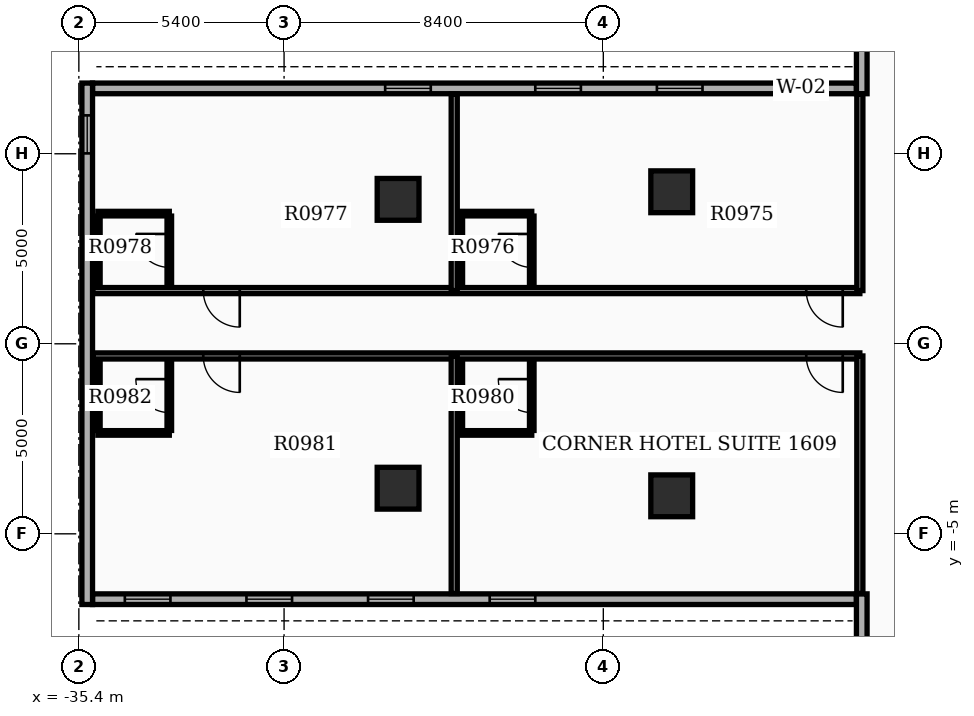
"""IFC4 building model, lengths in metres.
Left out: names, types, materials, properties, quantities, classifications, styles, units other than length and angle.
Written with IfcOpenShell. Run it as: python <this file> out.ifc"""

import sys

from ifc_helpers import new_model, si_unit, direction, frame, frame_2d, origin, origin_2d, place, context, subcontext, project, spatial, rectangle, extrude, element, fill, save


model = new_model("IFC4")
c1 = context("Model", 3, precision=1e-05, world=origin(), true_north=direction((0.0, 1.0)))
c2 = subcontext(c1, "Body", "Model", "MODEL_VIEW")
j1 = project(units=[si_unit("LENGTHUNIT", "METRE"), si_unit("PLANEANGLEUNIT", "RADIAN")], contexts=[c1])
p1 = place(None, origin())
s1 = spatial("IfcSite", under=j1, at=p1, CompositionType="ELEMENT")
p2 = place(p1, origin())
s2 = spatial("IfcBuilding", under=s1, at=p2, CompositionType="ELEMENT")
p3 = place(p2, frame((0.0, 0.0, 63.9)))
s3 = spatial("IfcBuildingStorey", under=s2, at=p3, CompositionType="ELEMENT", Elevation=63.9)
for number, where, z_axis, x_axis in (
    (1, (-19.8, -4.0, 0.0), (0.0, 0.0, 1.0), (1.0, 0.0, 0.0)),
    (2, (-19.8, 4.0, 0.0), (0.0, 0.0, 1.0), (1.0, 0.0, 0.0)),
    (3, (-27.0, -3.8, 0.0), (0.0, 0.0, 1.0), (1.0, 0.0, 0.0)),
    (4, (-27.0, 3.8, 0.0), (0.0, 0.0, 1.0), (1.0, 0.0, 0.0)),
):
    element("IfcColumn", number, at=place(p3, frame(where, z_axis=z_axis, x_axis=x_axis)), inside=s3, PredefinedType="COLUMN", context=c2, shape_type="SweptSolid", body=[
        extrude(rectangle(XDim=1.1, YDim=1.1, at=origin_2d()), origin(), (0.0, 0.0, 1.0), 3.9),
    ])
p4 = place(p3, frame((-14.94, 6.72, 0.0), z_axis=(0.0, 0.0, 1.0), x_axis=(-1.0, 0.0, 0.0)))
e5 = element("IfcWall", 5, at=p4, inside=s3, PredefinedType="STANDARD", context=c2, shape_type="SweptSolid", body=[
    extrude(rectangle(XDim=20.1, YDim=0.28, at=frame_2d((10.05, 0.0))), origin(), (0.0, 0.0, 1.0), 2.91),
])
p5 = place(p4, frame((0.85, 0.0, 0.8)))
e6 = element("IfcOpeningElement", 6, at=p5, cuts=e5, PredefinedType="OPENING", context=c2, shape_type="SweptSolid", body=[
    extrude(rectangle(XDim=1.2, YDim=1.6, at=frame_2d((0.6, 0.8))), frame((0.0, 0.15, 0.0), z_axis=(0.0, -1.0, 0.0), x_axis=(1.0, 0.0, 0.0)), (0.0, 0.0, 1.0), 0.3),
])
p6 = place(p4, frame((4.05, 0.0, 0.8)))
e7 = element("IfcOpeningElement", 7, at=p6, cuts=e5, PredefinedType="OPENING", context=c2, shape_type="SweptSolid", body=[
    extrude(rectangle(XDim=1.2, YDim=1.6, at=frame_2d((0.6, 0.8))), frame((0.0, 0.15, 0.0), z_axis=(0.0, -1.0, 0.0), x_axis=(1.0, 0.0, 0.0)), (0.0, 0.0, 1.0), 0.3),
])
p7 = place(p4, frame((7.25, 0.0, 0.8)))
e8 = element("IfcOpeningElement", 8, at=p7, cuts=e5, PredefinedType="OPENING", context=c2, shape_type="SweptSolid", body=[
    extrude(rectangle(XDim=1.2, YDim=1.6, at=frame_2d((0.6, 0.8))), frame((0.0, 0.15, 0.0), z_axis=(0.0, -1.0, 0.0), x_axis=(1.0, 0.0, 0.0)), (0.0, 0.0, 1.0), 0.3),
])
p8 = place(p4, frame((11.2, 0.0, 0.8)))
e9 = element("IfcOpeningElement", 9, at=p8, cuts=e5, PredefinedType="OPENING", context=c2, shape_type="SweptSolid", body=[
    extrude(rectangle(XDim=1.2, YDim=1.6, at=frame_2d((0.6, 0.8))), frame((0.0, 0.15, 0.0), z_axis=(0.0, -1.0, 0.0), x_axis=(1.0, 0.0, 0.0)), (0.0, 0.0, 1.0), 0.3),
])
p9 = place(p3, frame((-35.04, -6.72, 0.0), z_axis=(0.0, 0.0, 1.0), x_axis=(1.0, 0.0, 0.0)))
e10 = element("IfcWall", 10, at=p9, inside=s3, PredefinedType="STANDARD", context=c2, shape_type="SweptSolid", body=[
    extrude(rectangle(XDim=20.1, YDim=0.28, at=frame_2d((10.05, 0.0))), origin(), (0.0, 0.0, 1.0), 2.91),
])
p10 = place(p9, frame((0.85, 0.0, 0.8)))
e11 = element("IfcOpeningElement", 11, at=p10, cuts=e10, PredefinedType="OPENING", context=c2, shape_type="SweptSolid", body=[
    extrude(rectangle(XDim=1.2, YDim=1.6, at=frame_2d((0.6, 0.8))), frame((0.0, 0.15, 0.0), z_axis=(0.0, -1.0, 0.0), x_axis=(1.0, 0.0, 0.0)), (0.0, 0.0, 1.0), 0.3),
])
p11 = place(p9, frame((4.05, 0.0, 0.8)))
e12 = element("IfcOpeningElement", 12, at=p11, cuts=e10, PredefinedType="OPENING", context=c2, shape_type="SweptSolid", body=[
    extrude(rectangle(XDim=1.2, YDim=1.6, at=frame_2d((0.6, 0.8))), frame((0.0, 0.15, 0.0), z_axis=(0.0, -1.0, 0.0), x_axis=(1.0, 0.0, 0.0)), (0.0, 0.0, 1.0), 0.3),
])
p12 = place(p9, frame((7.25, 0.0, 0.8)))
e13 = element("IfcOpeningElement", 13, at=p12, cuts=e10, PredefinedType="OPENING", context=c2, shape_type="SweptSolid", body=[
    extrude(rectangle(XDim=1.2, YDim=1.6, at=frame_2d((0.6, 0.8))), frame((0.0, 0.15, 0.0), z_axis=(0.0, -1.0, 0.0), x_axis=(1.0, 0.0, 0.0)), (0.0, 0.0, 1.0), 0.3),
])
p13 = place(p9, frame((10.45, 0.0, 0.8)))
e14 = element("IfcOpeningElement", 14, at=p13, cuts=e10, PredefinedType="OPENING", context=c2, shape_type="SweptSolid", body=[
    extrude(rectangle(XDim=1.2, YDim=1.6, at=frame_2d((0.6, 0.8))), frame((0.0, 0.15, 0.0), z_axis=(0.0, -1.0, 0.0), x_axis=(1.0, 0.0, 0.0)), (0.0, 0.0, 1.0), 0.3),
])
p14 = place(p3, frame((-35.18, 6.86, 0.0), z_axis=(0.0, 0.0, 1.0), x_axis=(0.0, -1.0, 0.0)))
e15 = element("IfcWall", 15, at=p14, inside=s3, PredefinedType="STANDARD", context=c2, shape_type="SweptSolid", body=[
    extrude(rectangle(XDim=13.72, YDim=0.28, at=frame_2d((6.86, 0.0))), origin(), (0.0, 0.0, 1.0), 2.91),
])
p15 = place(p14, frame((0.85, 0.0, 0.85)))
e16 = element("IfcOpeningElement", 16, at=p15, cuts=e15, PredefinedType="OPENING", context=c2, shape_type="SweptSolid", body=[
    extrude(rectangle(XDim=1.0, YDim=1.5, at=frame_2d((0.5, 0.75))), frame((0.0, 0.15, 0.0), z_axis=(0.0, -1.0, 0.0), x_axis=(1.0, 0.0, 0.0)), (0.0, 0.0, 1.0), 0.3),
])
for number, where, z_axis, x_axis in (
    (17, (-14.8, 6.58, 0.0), (0.0, 0.0, 1.0), (0.0, 1.0, 0.0)),
    (18, (-14.8, -6.58, 0.0), (0.0, 0.0, 1.0), (0.0, -1.0, 0.0)),
):
    element("IfcWall", number, at=place(p3, frame(where, z_axis=z_axis, x_axis=x_axis)), inside=s3, PredefinedType="STANDARD", context=c2, shape_type="SweptSolid", body=[
        extrude(rectangle(XDim=6.86, YDim=0.28, at=frame_2d((3.43, 0.0))), origin(), (0.0, 0.0, 1.0), 2.91),
    ])
p16 = place(p3, frame((-14.85, 1.4, 0.0), z_axis=(0.0, 0.0, 1.0), x_axis=(-1.0, 0.0, 0.0)))
e19 = element("IfcWall", 19, at=p16, inside=s3, PredefinedType="PARTITIONING", context=c2, shape_type="SweptSolid", body=[
    extrude(rectangle(XDim=20.182, YDim=0.16, at=frame_2d((10.091, 0.0))), origin(), (0.0, 0.0, 1.0), 2.9),
])
p17 = place(p16, frame((0.45, 0.0, 0.0)))
e20 = element("IfcOpeningElement", 20, at=p17, cuts=e19, PredefinedType="OPENING", context=c2, shape_type="SweptSolid", body=[
    extrude(rectangle(XDim=0.96, YDim=2.15, at=frame_2d((0.48, 1.075))), frame((0.0, 0.09, 0.0), z_axis=(0.0, -1.0, 0.0), x_axis=(1.0, 0.0, 0.0)), (0.0, 0.0, 1.0), 0.18),
])
p18 = place(p16, frame((16.316, 0.0, 0.0)))
e21 = element("IfcOpeningElement", 21, at=p18, cuts=e19, PredefinedType="OPENING", context=c2, shape_type="SweptSolid", body=[
    extrude(rectangle(XDim=0.96, YDim=2.15, at=frame_2d((0.48, 1.075))), frame((0.0, 0.09, 0.0), z_axis=(0.0, -1.0, 0.0), x_axis=(1.0, 0.0, 0.0)), (0.0, 0.0, 1.0), 0.18),
])
for number, where, z_axis, x_axis in (
    (22, (-14.85, 1.4, 0.0), (0.0, 0.0, 1.0), (0.0, 1.0, 0.0)),
    (23, (-25.523, 1.4, 0.0), (0.0, 0.0, 1.0), (0.0, 1.0, 0.0)),
):
    element("IfcWall", number, at=place(p3, frame(where, z_axis=z_axis, x_axis=x_axis)), inside=s3, PredefinedType="PARTITIONING", context=c2, shape_type="SweptSolid", body=[
        extrude(rectangle(XDim=5.172, YDim=0.16, at=frame_2d((2.586, 0.0))), origin(), (0.0, 0.0, 1.0), 2.9),
    ])
p19 = place(p3, frame((-23.483, 1.54, 0.0), z_axis=(0.0, 0.0, 1.0), x_axis=(0.0, 1.0, 0.0)))
e24 = element("IfcWall", 24, at=p19, inside=s3, PredefinedType="PARTITIONING", context=c2, shape_type="SweptSolid", body=[
    extrude(rectangle(XDim=1.82, YDim=0.12, at=frame_2d((0.91, 0.0))), origin(), (0.0, 0.0, 1.0), 2.9),
])
p20 = place(p19, frame((0.47, 0.0, 0.0)))
e25 = element("IfcOpeningElement", 25, at=p20, cuts=e24, PredefinedType="OPENING", context=c2, shape_type="SweptSolid", body=[
    extrude(rectangle(XDim=0.88, YDim=2.1, at=frame_2d((0.44, 1.05))), frame((0.0, 0.07, 0.0), z_axis=(0.0, -1.0, 0.0), x_axis=(1.0, 0.0, 0.0)), (0.0, 0.0, 1.0), 0.14),
])
p21 = place(p3, frame((-25.363, 1.54, 0.0), z_axis=(0.0, 0.0, 1.0), x_axis=(0.0, 1.0, 0.0)))
e26 = element("IfcWall", 26, at=p21, inside=s3, PredefinedType="PARTITIONING", context=c2, shape_type="SweptSolid", body=[
    extrude(rectangle(XDim=1.82, YDim=0.12, at=frame_2d((0.91, 0.0))), origin(), (0.0, 0.0, 1.0), 2.9),
])
p22 = place(p3, frame((-23.483, 3.425, 0.0), z_axis=(0.0, 0.0, 1.0), x_axis=(-1.0, 0.0, 0.0)))
e27 = element("IfcWall", 27, at=p22, inside=s3, PredefinedType="PARTITIONING", context=c2, shape_type="SweptSolid", body=[
    extrude(rectangle(XDim=1.88, YDim=0.12, at=frame_2d((0.94, 0.0))), origin(), (0.0, 0.0, 1.0), 2.9),
])
p23 = place(p3, frame((-33.02, 1.54, 0.0), z_axis=(0.0, 0.0, 1.0), x_axis=(0.0, 1.0, 0.0)))
e28 = element("IfcWall", 28, at=p23, inside=s3, PredefinedType="PARTITIONING", context=c2, shape_type="SweptSolid", body=[
    extrude(rectangle(XDim=1.82, YDim=0.12, at=frame_2d((0.91, 0.0))), origin(), (0.0, 0.0, 1.0), 2.9),
])
p24 = place(p23, frame((0.47, 0.0, 0.0)))
e29 = element("IfcOpeningElement", 29, at=p24, cuts=e28, PredefinedType="OPENING", context=c2, shape_type="SweptSolid", body=[
    extrude(rectangle(XDim=0.88, YDim=2.1, at=frame_2d((0.44, 1.05))), frame((0.0, 0.07, 0.0), z_axis=(0.0, -1.0, 0.0), x_axis=(1.0, 0.0, 0.0)), (0.0, 0.0, 1.0), 0.14),
])
p25 = place(p3, frame((-34.9, 1.54, 0.0), z_axis=(0.0, 0.0, 1.0), x_axis=(0.0, 1.0, 0.0)))
e30 = element("IfcWall", 30, at=p25, inside=s3, PredefinedType="PARTITIONING", context=c2, shape_type="SweptSolid", body=[
    extrude(rectangle(XDim=1.82, YDim=0.12, at=frame_2d((0.91, 0.0))), origin(), (0.0, 0.0, 1.0), 2.9),
])
p26 = place(p3, frame((-33.02, 3.425, 0.0), z_axis=(0.0, 0.0, 1.0), x_axis=(-1.0, 0.0, 0.0)))
e31 = element("IfcWall", 31, at=p26, inside=s3, PredefinedType="PARTITIONING", context=c2, shape_type="SweptSolid", body=[
    extrude(rectangle(XDim=1.88, YDim=0.12, at=frame_2d((0.94, 0.0))), origin(), (0.0, 0.0, 1.0), 2.9),
])
p27 = place(p3, frame((-14.85, -0.32, 0.0), z_axis=(0.0, 0.0, 1.0), x_axis=(-1.0, 0.0, 0.0)))
e32 = element("IfcWall", 32, at=p27, inside=s3, PredefinedType="PARTITIONING", context=c2, shape_type="SweptSolid", body=[
    extrude(rectangle(XDim=20.182, YDim=0.16, at=frame_2d((10.091, 0.0))), origin(), (0.0, 0.0, 1.0), 2.9),
])
p28 = place(p27, frame((0.45, 0.0, 0.0)))
e33 = element("IfcOpeningElement", 33, at=p28, cuts=e32, PredefinedType="OPENING", context=c2, shape_type="SweptSolid", body=[
    extrude(rectangle(XDim=0.96, YDim=2.15, at=frame_2d((0.48, 1.075))), frame((0.0, 0.09, 0.0), z_axis=(0.0, -1.0, 0.0), x_axis=(1.0, 0.0, 0.0)), (0.0, 0.0, 1.0), 0.18),
])
p29 = place(p27, frame((16.316, 0.0, 0.0)))
e34 = element("IfcOpeningElement", 34, at=p29, cuts=e32, PredefinedType="OPENING", context=c2, shape_type="SweptSolid", body=[
    extrude(rectangle(XDim=0.96, YDim=2.15, at=frame_2d((0.48, 1.075))), frame((0.0, 0.09, 0.0), z_axis=(0.0, -1.0, 0.0), x_axis=(1.0, 0.0, 0.0)), (0.0, 0.0, 1.0), 0.18),
])
for number, where, z_axis, x_axis in (
    (35, (-14.85, -0.32, 0.0), (0.0, 0.0, 1.0), (0.0, -1.0, 0.0)),
    (36, (-25.523, -0.32, 0.0), (0.0, 0.0, 1.0), (0.0, -1.0, 0.0)),
):
    element("IfcWall", number, at=place(p3, frame(where, z_axis=z_axis, x_axis=x_axis)), inside=s3, PredefinedType="PARTITIONING", context=c2, shape_type="SweptSolid", body=[
        extrude(rectangle(XDim=6.252, YDim=0.16, at=frame_2d((3.126, 0.0))), origin(), (0.0, 0.0, 1.0), 2.9),
    ])
p30 = place(p3, frame((-23.483, -2.28, 0.0), z_axis=(0.0, 0.0, 1.0), x_axis=(0.0, 1.0, 0.0)))
e37 = element("IfcWall", 37, at=p30, inside=s3, PredefinedType="PARTITIONING", context=c2, shape_type="SweptSolid", body=[
    extrude(rectangle(XDim=1.82, YDim=0.12, at=frame_2d((0.91, 0.0))), origin(), (0.0, 0.0, 1.0), 2.9),
])
p31 = place(p30, frame((0.47, 0.0, 0.0)))
e38 = element("IfcOpeningElement", 38, at=p31, cuts=e37, PredefinedType="OPENING", context=c2, shape_type="SweptSolid", body=[
    extrude(rectangle(XDim=0.88, YDim=2.1, at=frame_2d((0.44, 1.05))), frame((0.0, 0.07, 0.0), z_axis=(0.0, -1.0, 0.0), x_axis=(1.0, 0.0, 0.0)), (0.0, 0.0, 1.0), 0.14),
])
p32 = place(p3, frame((-25.363, -2.28, 0.0), z_axis=(0.0, 0.0, 1.0), x_axis=(0.0, 1.0, 0.0)))
e39 = element("IfcWall", 39, at=p32, inside=s3, PredefinedType="PARTITIONING", context=c2, shape_type="SweptSolid", body=[
    extrude(rectangle(XDim=1.82, YDim=0.12, at=frame_2d((0.91, 0.0))), origin(), (0.0, 0.0, 1.0), 2.9),
])
p33 = place(p3, frame((-23.483, -2.345, 0.0), z_axis=(0.0, 0.0, 1.0), x_axis=(-1.0, 0.0, 0.0)))
e40 = element("IfcWall", 40, at=p33, inside=s3, PredefinedType="PARTITIONING", context=c2, shape_type="SweptSolid", body=[
    extrude(rectangle(XDim=1.88, YDim=0.12, at=frame_2d((0.94, 0.0))), origin(), (0.0, 0.0, 1.0), 2.9),
])
p34 = place(p3, frame((-33.02, -2.28, 0.0), z_axis=(0.0, 0.0, 1.0), x_axis=(0.0, 1.0, 0.0)))
e41 = element("IfcWall", 41, at=p34, inside=s3, PredefinedType="PARTITIONING", context=c2, shape_type="SweptSolid", body=[
    extrude(rectangle(XDim=1.82, YDim=0.12, at=frame_2d((0.91, 0.0))), origin(), (0.0, 0.0, 1.0), 2.9),
])
p35 = place(p34, frame((0.47, 0.0, 0.0)))
e42 = element("IfcOpeningElement", 42, at=p35, cuts=e41, PredefinedType="OPENING", context=c2, shape_type="SweptSolid", body=[
    extrude(rectangle(XDim=0.88, YDim=2.1, at=frame_2d((0.44, 1.05))), frame((0.0, 0.07, 0.0), z_axis=(0.0, -1.0, 0.0), x_axis=(1.0, 0.0, 0.0)), (0.0, 0.0, 1.0), 0.14),
])
p36 = place(p3, frame((-34.9, -2.28, 0.0), z_axis=(0.0, 0.0, 1.0), x_axis=(0.0, 1.0, 0.0)))
e43 = element("IfcWall", 43, at=p36, inside=s3, PredefinedType="PARTITIONING", context=c2, shape_type="SweptSolid", body=[
    extrude(rectangle(XDim=1.82, YDim=0.12, at=frame_2d((0.91, 0.0))), origin(), (0.0, 0.0, 1.0), 2.9),
])
p37 = place(p3, frame((-33.02, -2.345, 0.0), z_axis=(0.0, 0.0, 1.0), x_axis=(-1.0, 0.0, 0.0)))
e44 = element("IfcWall", 44, at=p37, inside=s3, PredefinedType="PARTITIONING", context=c2, shape_type="SweptSolid", body=[
    extrude(rectangle(XDim=1.88, YDim=0.12, at=frame_2d((0.94, 0.0))), origin(), (0.0, 0.0, 1.0), 2.9),
])
p38 = place(p5, origin())
e45 = element("IfcWindow", 45, at=p38, inside=s3, PartitioningType="SINGLE_PANEL", PredefinedType="WINDOW", context=c2, shape_type="SweptSolid", body=[
    extrude(rectangle(XDim=1.2, YDim=1.6, at=frame_2d((0.6, 0.8))), frame((0.0, 0.03, 0.0), z_axis=(0.0, -1.0, 0.0), x_axis=(1.0, 0.0, 0.0)), (0.0, 0.0, 1.0), 0.06),
])
fill(e6, e45)
p39 = place(p6, origin())
e46 = element("IfcWindow", 46, at=p39, inside=s3, PartitioningType="SINGLE_PANEL", PredefinedType="WINDOW", context=c2, shape_type="SweptSolid", body=[
    extrude(rectangle(XDim=1.2, YDim=1.6, at=frame_2d((0.6, 0.8))), frame((0.0, 0.03, 0.0), z_axis=(0.0, -1.0, 0.0), x_axis=(1.0, 0.0, 0.0)), (0.0, 0.0, 1.0), 0.06),
])
fill(e7, e46)
p40 = place(p7, origin())
e47 = element("IfcWindow", 47, at=p40, inside=s3, PartitioningType="SINGLE_PANEL", PredefinedType="WINDOW", context=c2, shape_type="SweptSolid", body=[
    extrude(rectangle(XDim=1.2, YDim=1.6, at=frame_2d((0.6, 0.8))), frame((0.0, 0.03, 0.0), z_axis=(0.0, -1.0, 0.0), x_axis=(1.0, 0.0, 0.0)), (0.0, 0.0, 1.0), 0.06),
])
fill(e8, e47)
p41 = place(p8, origin())
e48 = element("IfcWindow", 48, at=p41, inside=s3, PartitioningType="SINGLE_PANEL", PredefinedType="WINDOW", context=c2, shape_type="SweptSolid", body=[
    extrude(rectangle(XDim=1.2, YDim=1.6, at=frame_2d((0.6, 0.8))), frame((0.0, 0.03, 0.0), z_axis=(0.0, -1.0, 0.0), x_axis=(1.0, 0.0, 0.0)), (0.0, 0.0, 1.0), 0.06),
])
fill(e9, e48)
p42 = place(p10, origin())
e49 = element("IfcWindow", 49, at=p42, inside=s3, PartitioningType="SINGLE_PANEL", PredefinedType="WINDOW", context=c2, shape_type="SweptSolid", body=[
    extrude(rectangle(XDim=1.2, YDim=1.6, at=frame_2d((0.6, 0.8))), frame((0.0, 0.03, 0.0), z_axis=(0.0, -1.0, 0.0), x_axis=(1.0, 0.0, 0.0)), (0.0, 0.0, 1.0), 0.06),
])
fill(e11, e49)
p43 = place(p11, origin())
e50 = element("IfcWindow", 50, at=p43, inside=s3, PartitioningType="SINGLE_PANEL", PredefinedType="WINDOW", context=c2, shape_type="SweptSolid", body=[
    extrude(rectangle(XDim=1.2, YDim=1.6, at=frame_2d((0.6, 0.8))), frame((0.0, 0.03, 0.0), z_axis=(0.0, -1.0, 0.0), x_axis=(1.0, 0.0, 0.0)), (0.0, 0.0, 1.0), 0.06),
])
fill(e12, e50)
p44 = place(p12, origin())
e51 = element("IfcWindow", 51, at=p44, inside=s3, PartitioningType="SINGLE_PANEL", PredefinedType="WINDOW", context=c2, shape_type="SweptSolid", body=[
    extrude(rectangle(XDim=1.2, YDim=1.6, at=frame_2d((0.6, 0.8))), frame((0.0, 0.03, 0.0), z_axis=(0.0, -1.0, 0.0), x_axis=(1.0, 0.0, 0.0)), (0.0, 0.0, 1.0), 0.06),
])
fill(e13, e51)
p45 = place(p13, origin())
e52 = element("IfcWindow", 52, at=p45, inside=s3, PartitioningType="SINGLE_PANEL", PredefinedType="WINDOW", context=c2, shape_type="SweptSolid", body=[
    extrude(rectangle(XDim=1.2, YDim=1.6, at=frame_2d((0.6, 0.8))), frame((0.0, 0.03, 0.0), z_axis=(0.0, -1.0, 0.0), x_axis=(1.0, 0.0, 0.0)), (0.0, 0.0, 1.0), 0.06),
])
fill(e14, e52)
p46 = place(p15, origin())
e53 = element("IfcWindow", 53, at=p46, inside=s3, PartitioningType="SINGLE_PANEL", PredefinedType="WINDOW", context=c2, shape_type="SweptSolid", body=[
    extrude(rectangle(XDim=1.0, YDim=1.5, at=frame_2d((0.5, 0.75))), frame((0.0, 0.03, 0.0), z_axis=(0.0, -1.0, 0.0), x_axis=(1.0, 0.0, 0.0)), (0.0, 0.0, 1.0), 0.06),
])
fill(e16, e53)
p47 = place(p17, origin())
e54 = element("IfcDoor", 54, at=p47, inside=s3, OperationType="SINGLE_SWING_LEFT", PredefinedType="DOOR", context=c2, shape_type="SweptSolid", body=[
    extrude(rectangle(XDim=0.96, YDim=2.15, at=frame_2d((0.48, 1.075))), frame((0.0, 0.025, 0.0), z_axis=(0.0, -1.0, 0.0), x_axis=(1.0, 0.0, 0.0)), (0.0, 0.0, 1.0), 0.05),
])
fill(e20, e54)
p48 = place(p20, origin())
e55 = element("IfcDoor", 55, at=p48, inside=s3, OperationType="SINGLE_SWING_RIGHT", PredefinedType="DOOR", context=c2, shape_type="SweptSolid", body=[
    extrude(rectangle(XDim=0.88, YDim=2.1, at=frame_2d((0.44, 1.05))), frame((0.0, 0.025, 0.0), z_axis=(0.0, -1.0, 0.0), x_axis=(1.0, 0.0, 0.0)), (0.0, 0.0, 1.0), 0.05),
])
fill(e25, e55)
p49 = place(p18, origin())
e56 = element("IfcDoor", 56, at=p49, inside=s3, OperationType="SINGLE_SWING_LEFT", PredefinedType="DOOR", context=c2, shape_type="SweptSolid", body=[
    extrude(rectangle(XDim=0.96, YDim=2.15, at=frame_2d((0.48, 1.075))), frame((0.0, 0.025, 0.0), z_axis=(0.0, -1.0, 0.0), x_axis=(1.0, 0.0, 0.0)), (0.0, 0.0, 1.0), 0.05),
])
fill(e21, e56)
p50 = place(p24, origin())
e57 = element("IfcDoor", 57, at=p50, inside=s3, OperationType="SINGLE_SWING_RIGHT", PredefinedType="DOOR", context=c2, shape_type="SweptSolid", body=[
    extrude(rectangle(XDim=0.88, YDim=2.1, at=frame_2d((0.44, 1.05))), frame((0.0, 0.025, 0.0), z_axis=(0.0, -1.0, 0.0), x_axis=(1.0, 0.0, 0.0)), (0.0, 0.0, 1.0), 0.05),
])
fill(e29, e57)
p51 = place(p28, origin())
e58 = element("IfcDoor", 58, at=p51, inside=s3, OperationType="SINGLE_SWING_LEFT", PredefinedType="DOOR", context=c2, shape_type="SweptSolid", body=[
    extrude(rectangle(XDim=0.96, YDim=2.15, at=frame_2d((0.48, 1.075))), frame((0.0, 0.025, 0.0), z_axis=(0.0, -1.0, 0.0), x_axis=(1.0, 0.0, 0.0)), (0.0, 0.0, 1.0), 0.05),
])
fill(e33, e58)
p52 = place(p31, origin())
e59 = element("IfcDoor", 59, at=p52, inside=s3, OperationType="SINGLE_SWING_RIGHT", PredefinedType="DOOR", context=c2, shape_type="SweptSolid", body=[
    extrude(rectangle(XDim=0.88, YDim=2.1, at=frame_2d((0.44, 1.05))), frame((0.0, 0.025, 0.0), z_axis=(0.0, -1.0, 0.0), x_axis=(1.0, 0.0, 0.0)), (0.0, 0.0, 1.0), 0.05),
])
fill(e38, e59)
p53 = place(p29, origin())
e60 = element("IfcDoor", 60, at=p53, inside=s3, OperationType="SINGLE_SWING_LEFT", PredefinedType="DOOR", context=c2, shape_type="SweptSolid", body=[
    extrude(rectangle(XDim=0.96, YDim=2.15, at=frame_2d((0.48, 1.075))), frame((0.0, 0.025, 0.0), z_axis=(0.0, -1.0, 0.0), x_axis=(1.0, 0.0, 0.0)), (0.0, 0.0, 1.0), 0.05),
])
fill(e34, e60)
p54 = place(p35, origin())
e61 = element("IfcDoor", 61, at=p54, inside=s3, OperationType="SINGLE_SWING_RIGHT", PredefinedType="DOOR", context=c2, shape_type="SweptSolid", body=[
    extrude(rectangle(XDim=0.88, YDim=2.1, at=frame_2d((0.44, 1.05))), frame((0.0, 0.025, 0.0), z_axis=(0.0, -1.0, 0.0), x_axis=(1.0, 0.0, 0.0)), (0.0, 0.0, 1.0), 0.05),
])
fill(e42, e61)
save(model, sys.argv[1])
